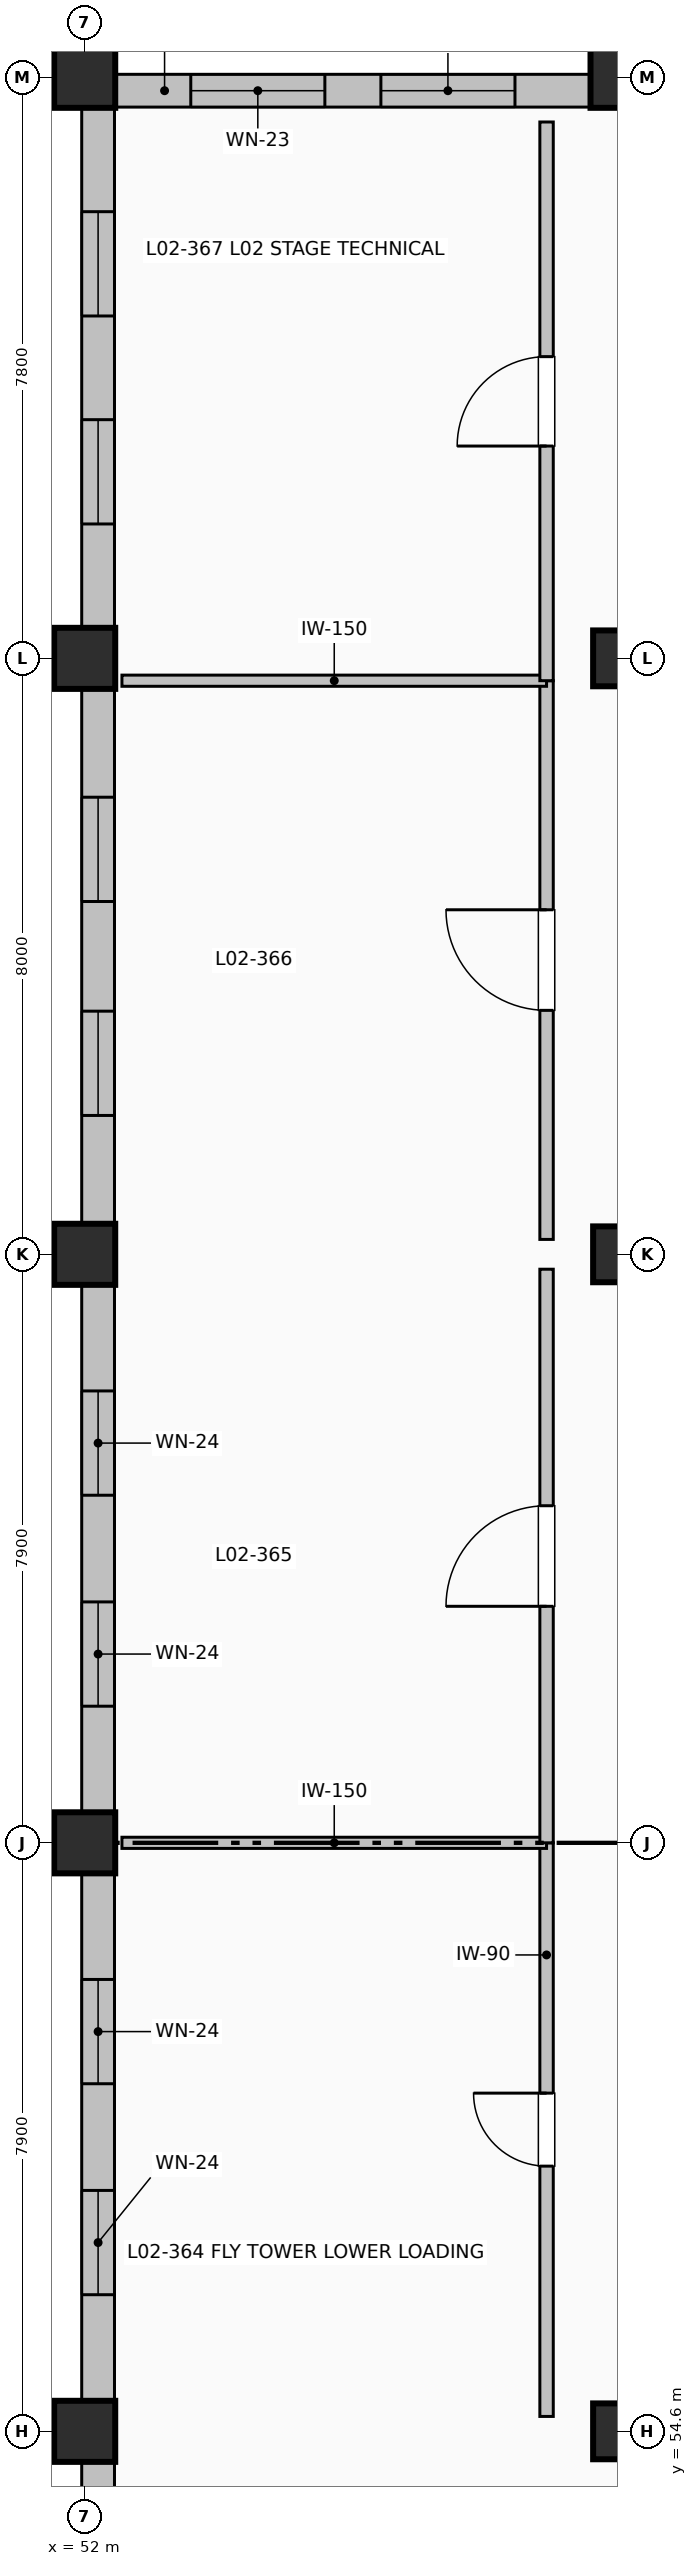
"""IFC4 building model, lengths in metres.
Left out: names, types, materials, properties, quantities, classifications, styles, units other than length and angle.
Written with IfcOpenShell. Run it as: python <this file> out.ifc"""

import sys

from ifc_helpers import new_model, si_unit, direction, frame, frame_2d, origin, origin_2d, place, context, subcontext, project, spatial, rectangle, extrude, element, fill, save


model = new_model("IFC4")
c1 = context("Model", 3, precision=1e-05, world=origin(), true_north=direction((0.0, 1.0)))
c2 = subcontext(c1, "Body", "Model", "MODEL_VIEW")
j1 = project(units=[si_unit("LENGTHUNIT", "METRE"), si_unit("PLANEANGLEUNIT", "RADIAN")], contexts=[c1])
p1 = place(None, origin())
s1 = spatial("IfcSite", under=j1, at=p1, CompositionType="ELEMENT")
p2 = place(p1, origin())
s2 = spatial("IfcBuilding", under=s1, at=p2, CompositionType="ELEMENT")
p3 = place(p2, frame((0.0, 0.0, 10.2)))
s3 = spatial("IfcBuildingStorey", under=s2, at=p3, CompositionType="ELEMENT", Elevation=10.2)
for number, where, z_axis, x_axis in (
    (1, (52.0, 54.6, 0.0), (0.0, 0.0, 1.0), (1.0, 0.0, 0.0)),
    (2, (52.0, 62.5, 0.0), (0.0, 0.0, 1.0), (1.0, 0.0, 0.0)),
    (3, (52.0, 70.4, 0.0), (0.0, 0.0, 1.0), (1.0, 0.0, 0.0)),
    (4, (52.0, 78.4, 0.0), (0.0, 0.0, 1.0), (1.0, 0.0, 0.0)),
    (5, (52.0, 86.2, 0.0), (0.0, 0.0, 1.0), (1.0, 0.0, 0.0)),
):
    element("IfcColumn", number, at=place(p3, frame(where, z_axis=z_axis, x_axis=x_axis)), inside=s3, PredefinedType="COLUMN", context=c2, shape_type="SweptSolid", body=[
        extrude(rectangle(XDim=0.82, YDim=0.82, at=origin_2d()), origin(), (0.0, 0.0, 1.0), 4.8),
    ])
for number, where, z_axis, x_axis in (
    (6, (59.2, 54.6, 0.0), (0.0, 0.0, 1.0), (1.0, 0.0, 0.0)),
    (7, (59.2, 70.4, 0.0), (0.0, 0.0, 1.0), (1.0, 0.0, 0.0)),
    (8, (59.2, 78.4, 0.0), (0.0, 0.0, 1.0), (1.0, 0.0, 0.0)),
):
    element("IfcColumn", number, at=place(p3, frame(where, z_axis=z_axis, x_axis=x_axis)), inside=s3, PredefinedType="COLUMN", context=c2, shape_type="SweptSolid", body=[
        extrude(rectangle(XDim=0.75, YDim=0.75, at=origin_2d()), origin(), (0.0, 0.0, 1.0), 4.8),
    ])
p4 = place(p3, frame((59.2, 86.2, 0.0), z_axis=(0.0, 0.0, 1.0), x_axis=(1.0, 0.0, 0.0)))
e9 = element("IfcColumn", 9, at=p4, inside=s3, PredefinedType="COLUMN", context=c2, shape_type="SweptSolid", body=[
    extrude(rectangle(XDim=0.82, YDim=0.82, at=origin_2d()), origin(), (0.0, 0.0, 1.0), 4.8),
])
p5 = place(p3, frame((52.41, 86.02, 0.0), z_axis=(0.0, 0.0, 1.0), x_axis=(1.0, 0.0, 0.0)))
e10 = element("IfcWall", 10, at=p5, inside=s3, PredefinedType="SOLIDWALL", context=c2, shape_type="SweptSolid", body=[
    extrude(rectangle(XDim=6.38, YDim=0.44, at=frame_2d((3.19, 0.0))), origin(), (0.0, 0.0, 1.0), 3.722),
])
p6 = place(p5, frame((1.014, 0.0, 1.05)))
e11 = element("IfcOpeningElement", 11, at=p6, cuts=e10, PredefinedType="OPENING", context=c2, shape_type="SweptSolid", body=[
    extrude(rectangle(XDim=1.8, YDim=1.25, at=frame_2d((0.9, 0.625))), frame((0.0, 0.23, 0.0), z_axis=(0.0, -1.0, 0.0), x_axis=(1.0, 0.0, 0.0)), (0.0, 0.0, 1.0), 0.46),
])
p7 = place(p5, frame((3.566, 0.0, 1.05)))
e12 = element("IfcOpeningElement", 12, at=p7, cuts=e10, PredefinedType="OPENING", context=c2, shape_type="SweptSolid", body=[
    extrude(rectangle(XDim=1.8, YDim=1.25, at=frame_2d((0.9, 0.625))), frame((0.0, 0.23, 0.0), z_axis=(0.0, -1.0, 0.0), x_axis=(1.0, 0.0, 0.0)), (0.0, 0.0, 1.0), 0.46),
])
p8 = place(p3, frame((52.18, 47.01, 0.0), z_axis=(0.0, 0.0, 1.0), x_axis=(0.0, 1.0, 0.0)))
e13 = element("IfcWall", 13, at=p8, inside=s3, PredefinedType="SOLIDWALL", context=c2, shape_type="SweptSolid", body=[
    extrude(rectangle(XDim=7.18, YDim=0.44, at=frame_2d((3.59, 0.0))), origin(), (0.0, 0.0, 1.0), 3.722),
])
p9 = place(p8, frame((1.454, 0.0, 1.0)))
e14 = element("IfcOpeningElement", 14, at=p9, cuts=e13, PredefinedType="OPENING", context=c2, shape_type="SweptSolid", body=[
    extrude(rectangle(XDim=1.4, YDim=1.2, at=frame_2d((0.7, 0.6))), frame((0.0, 0.23, 0.0), z_axis=(0.0, -1.0, 0.0), x_axis=(1.0, 0.0, 0.0)), (0.0, 0.0, 1.0), 0.46),
])
p10 = place(p8, frame((4.326, 0.0, 1.0)))
e15 = element("IfcOpeningElement", 15, at=p10, cuts=e13, PredefinedType="OPENING", context=c2, shape_type="SweptSolid", body=[
    extrude(rectangle(XDim=1.4, YDim=1.2, at=frame_2d((0.7, 0.6))), frame((0.0, 0.23, 0.0), z_axis=(0.0, -1.0, 0.0), x_axis=(1.0, 0.0, 0.0)), (0.0, 0.0, 1.0), 0.46),
])
p11 = place(p3, frame((52.18, 55.01, 0.0), z_axis=(0.0, 0.0, 1.0), x_axis=(0.0, 1.0, 0.0)))
e16 = element("IfcWall", 16, at=p11, inside=s3, PredefinedType="SOLIDWALL", context=c2, shape_type="SweptSolid", body=[
    extrude(rectangle(XDim=7.08, YDim=0.44, at=frame_2d((3.54, 0.0))), origin(), (0.0, 0.0, 1.0), 3.722),
])
p12 = place(p11, frame((1.424, 0.0, 1.0)))
e17 = element("IfcOpeningElement", 17, at=p12, cuts=e16, PredefinedType="OPENING", context=c2, shape_type="SweptSolid", body=[
    extrude(rectangle(XDim=1.4, YDim=1.2, at=frame_2d((0.7, 0.6))), frame((0.0, 0.23, 0.0), z_axis=(0.0, -1.0, 0.0), x_axis=(1.0, 0.0, 0.0)), (0.0, 0.0, 1.0), 0.46),
])
p13 = place(p11, frame((4.256, 0.0, 1.0)))
e18 = element("IfcOpeningElement", 18, at=p13, cuts=e16, PredefinedType="OPENING", context=c2, shape_type="SweptSolid", body=[
    extrude(rectangle(XDim=1.4, YDim=1.2, at=frame_2d((0.7, 0.6))), frame((0.0, 0.23, 0.0), z_axis=(0.0, -1.0, 0.0), x_axis=(1.0, 0.0, 0.0)), (0.0, 0.0, 1.0), 0.46),
])
p14 = place(p3, frame((52.18, 62.91, 0.0), z_axis=(0.0, 0.0, 1.0), x_axis=(0.0, 1.0, 0.0)))
e19 = element("IfcWall", 19, at=p14, inside=s3, PredefinedType="SOLIDWALL", context=c2, shape_type="SweptSolid", body=[
    extrude(rectangle(XDim=7.08, YDim=0.44, at=frame_2d((3.54, 0.0))), origin(), (0.0, 0.0, 1.0), 3.722),
])
p15 = place(p14, frame((1.424, 0.0, 1.0)))
e20 = element("IfcOpeningElement", 20, at=p15, cuts=e19, PredefinedType="OPENING", context=c2, shape_type="SweptSolid", body=[
    extrude(rectangle(XDim=1.4, YDim=1.2, at=frame_2d((0.7, 0.6))), frame((0.0, 0.23, 0.0), z_axis=(0.0, -1.0, 0.0), x_axis=(1.0, 0.0, 0.0)), (0.0, 0.0, 1.0), 0.46),
])
p16 = place(p14, frame((4.256, 0.0, 1.0)))
e21 = element("IfcOpeningElement", 21, at=p16, cuts=e19, PredefinedType="OPENING", context=c2, shape_type="SweptSolid", body=[
    extrude(rectangle(XDim=1.4, YDim=1.2, at=frame_2d((0.7, 0.6))), frame((0.0, 0.23, 0.0), z_axis=(0.0, -1.0, 0.0), x_axis=(1.0, 0.0, 0.0)), (0.0, 0.0, 1.0), 0.46),
])
p17 = place(p3, frame((52.18, 70.81, 0.0), z_axis=(0.0, 0.0, 1.0), x_axis=(0.0, 1.0, 0.0)))
e22 = element("IfcWall", 22, at=p17, inside=s3, PredefinedType="SOLIDWALL", context=c2, shape_type="SweptSolid", body=[
    extrude(rectangle(XDim=7.18, YDim=0.44, at=frame_2d((3.59, 0.0))), origin(), (0.0, 0.0, 1.0), 3.722),
])
p18 = place(p17, frame((1.454, 0.0, 1.0)))
e23 = element("IfcOpeningElement", 23, at=p18, cuts=e22, PredefinedType="OPENING", context=c2, shape_type="SweptSolid", body=[
    extrude(rectangle(XDim=1.4, YDim=1.2, at=frame_2d((0.7, 0.6))), frame((0.0, 0.23, 0.0), z_axis=(0.0, -1.0, 0.0), x_axis=(1.0, 0.0, 0.0)), (0.0, 0.0, 1.0), 0.46),
])
p19 = place(p17, frame((4.326, 0.0, 1.0)))
e24 = element("IfcOpeningElement", 24, at=p19, cuts=e22, PredefinedType="OPENING", context=c2, shape_type="SweptSolid", body=[
    extrude(rectangle(XDim=1.4, YDim=1.2, at=frame_2d((0.7, 0.6))), frame((0.0, 0.23, 0.0), z_axis=(0.0, -1.0, 0.0), x_axis=(1.0, 0.0, 0.0)), (0.0, 0.0, 1.0), 0.46),
])
p20 = place(p3, frame((52.18, 78.81, 0.0), z_axis=(0.0, 0.0, 1.0), x_axis=(0.0, 1.0, 0.0)))
e25 = element("IfcWall", 25, at=p20, inside=s3, PredefinedType="SOLIDWALL", context=c2, shape_type="SweptSolid", body=[
    extrude(rectangle(XDim=6.98, YDim=0.44, at=frame_2d((3.49, 0.0))), origin(), (0.0, 0.0, 1.0), 3.722),
])
p21 = place(p20, frame((1.394, 0.0, 1.0)))
e26 = element("IfcOpeningElement", 26, at=p21, cuts=e25, PredefinedType="OPENING", context=c2, shape_type="SweptSolid", body=[
    extrude(rectangle(XDim=1.4, YDim=1.2, at=frame_2d((0.7, 0.6))), frame((0.0, 0.23, 0.0), z_axis=(0.0, -1.0, 0.0), x_axis=(1.0, 0.0, 0.0)), (0.0, 0.0, 1.0), 0.46),
])
p22 = place(p20, frame((4.186, 0.0, 1.0)))
e27 = element("IfcOpeningElement", 27, at=p22, cuts=e25, PredefinedType="OPENING", context=c2, shape_type="SweptSolid", body=[
    extrude(rectangle(XDim=1.4, YDim=1.2, at=frame_2d((0.7, 0.6))), frame((0.0, 0.23, 0.0), z_axis=(0.0, -1.0, 0.0), x_axis=(1.0, 0.0, 0.0)), (0.0, 0.0, 1.0), 0.46),
])
p23 = place(p3, frame((58.2, 54.8, 0.0), z_axis=(0.0, 0.0, 1.0), x_axis=(0.0, 1.0, 0.0)))
e28 = element("IfcWall", 28, at=p23, inside=s3, PredefinedType="PARTITIONING", context=c2, shape_type="SweptSolid", body=[
    extrude(rectangle(XDim=7.7, YDim=0.18, at=frame_2d((3.85, 0.0))), origin(), (0.0, 0.0, 1.0), 4.472),
])
p24 = place(p23, frame((3.36, 0.0, 0.0)))
e29 = element("IfcOpeningElement", 29, at=p24, cuts=e28, PredefinedType="OPENING", context=c2, shape_type="SweptSolid", body=[
    extrude(rectangle(XDim=0.98, YDim=2.08, at=frame_2d((0.49, 1.04))), frame((0.0, 0.1, 0.0), z_axis=(0.0, -1.0, 0.0), x_axis=(1.0, 0.0, 0.0)), (0.0, 0.0, 1.0), 0.2),
])
p25 = place(p3, frame((52.5, 62.5, 0.0), z_axis=(0.0, 0.0, 1.0), x_axis=(1.0, 0.0, 0.0)))
e30 = element("IfcWall", 30, at=p25, inside=s3, PredefinedType="PARTITIONING", context=c2, shape_type="SweptSolid", body=[
    extrude(rectangle(XDim=5.7, YDim=0.15, at=frame_2d((2.85, 0.0))), origin(), (0.0, 0.0, 1.0), 2.872),
])
p26 = place(p3, frame((58.2, 62.5, 0.0), z_axis=(0.0, 0.0, 1.0), x_axis=(0.0, 1.0, 0.0)))
e31 = element("IfcWall", 31, at=p26, inside=s3, PredefinedType="PARTITIONING", context=c2, shape_type="SweptSolid", body=[
    extrude(rectangle(XDim=7.7, YDim=0.18, at=frame_2d((3.85, 0.0))), origin(), (0.0, 0.0, 1.0), 4.472),
])
p27 = place(p26, frame((3.175, 0.0, 0.0)))
e32 = element("IfcOpeningElement", 32, at=p27, cuts=e31, PredefinedType="OPENING", context=c2, shape_type="SweptSolid", body=[
    extrude(rectangle(XDim=1.35, YDim=2.16, at=frame_2d((0.675, 1.08))), frame((0.0, 0.1, 0.0), z_axis=(0.0, -1.0, 0.0), x_axis=(1.0, 0.0, 0.0)), (0.0, 0.0, 1.0), 0.2),
])
p28 = place(p3, frame((58.2, 70.6, 0.0), z_axis=(0.0, 0.0, 1.0), x_axis=(0.0, 1.0, 0.0)))
e33 = element("IfcWall", 33, at=p28, inside=s3, PredefinedType="PARTITIONING", context=c2, shape_type="SweptSolid", body=[
    extrude(rectangle(XDim=7.5, YDim=0.18, at=frame_2d((3.75, 0.0))), origin(), (0.0, 0.0, 1.0), 4.472),
])
p29 = place(p28, frame((3.075, 0.0, 0.0)))
e34 = element("IfcOpeningElement", 34, at=p29, cuts=e33, PredefinedType="OPENING", context=c2, shape_type="SweptSolid", body=[
    extrude(rectangle(XDim=1.35, YDim=2.16, at=frame_2d((0.675, 1.08))), frame((0.0, 0.1, 0.0), z_axis=(0.0, -1.0, 0.0), x_axis=(1.0, 0.0, 0.0)), (0.0, 0.0, 1.0), 0.2),
])
p30 = place(p3, frame((52.5, 78.1, 0.0), z_axis=(0.0, 0.0, 1.0), x_axis=(1.0, 0.0, 0.0)))
e35 = element("IfcWall", 35, at=p30, inside=s3, PredefinedType="PARTITIONING", context=c2, shape_type="SweptSolid", body=[
    extrude(rectangle(XDim=5.7, YDim=0.15, at=frame_2d((2.85, 0.0))), origin(), (0.0, 0.0, 1.0), 4.472),
])
p31 = place(p3, frame((58.2, 78.1, 0.0), z_axis=(0.0, 0.0, 1.0), x_axis=(0.0, 1.0, 0.0)))
e36 = element("IfcWall", 36, at=p31, inside=s3, PredefinedType="PARTITIONING", context=c2, shape_type="SweptSolid", body=[
    extrude(rectangle(XDim=7.5, YDim=0.18, at=frame_2d((3.75, 0.0))), origin(), (0.0, 0.0, 1.0), 4.472),
])
p32 = place(p31, frame((3.15, 0.0, 0.0)))
e37 = element("IfcOpeningElement", 37, at=p32, cuts=e36, PredefinedType="OPENING", context=c2, shape_type="SweptSolid", body=[
    extrude(rectangle(XDim=1.2, YDim=2.1, at=frame_2d((0.6, 1.05))), frame((0.0, 0.1, 0.0), z_axis=(0.0, -1.0, 0.0), x_axis=(1.0, 0.0, 0.0)), (0.0, 0.0, 1.0), 0.2),
])
p33 = place(p6, origin())
e38 = element("IfcWindow", 38, at=p33, inside=s3, PartitioningType="SINGLE_PANEL", PredefinedType="WINDOW", context=c2, shape_type="SweptSolid", body=[
    extrude(rectangle(XDim=1.8, YDim=1.25, at=frame_2d((0.9, 0.625))), frame((0.0, 0.03, 0.0), z_axis=(0.0, -1.0, 0.0), x_axis=(1.0, 0.0, 0.0)), (0.0, 0.0, 1.0), 0.06),
])
fill(e11, e38)
p34 = place(p7, origin())
e39 = element("IfcWindow", 39, at=p34, inside=s3, PartitioningType="SINGLE_PANEL", PredefinedType="WINDOW", context=c2, shape_type="SweptSolid", body=[
    extrude(rectangle(XDim=1.8, YDim=1.25, at=frame_2d((0.9, 0.625))), frame((0.0, 0.03, 0.0), z_axis=(0.0, -1.0, 0.0), x_axis=(1.0, 0.0, 0.0)), (0.0, 0.0, 1.0), 0.06),
])
fill(e12, e39)
p35 = place(p12, origin())
e40 = element("IfcWindow", 40, at=p35, inside=s3, PartitioningType="SINGLE_PANEL", PredefinedType="WINDOW", context=c2, shape_type="SweptSolid", body=[
    extrude(rectangle(XDim=1.4, YDim=1.2, at=frame_2d((0.7, 0.6))), frame((0.0, 0.03, 0.0), z_axis=(0.0, -1.0, 0.0), x_axis=(1.0, 0.0, 0.0)), (0.0, 0.0, 1.0), 0.06),
])
fill(e17, e40)
p36 = place(p13, origin())
e41 = element("IfcWindow", 41, at=p36, inside=s3, PartitioningType="SINGLE_PANEL", PredefinedType="WINDOW", context=c2, shape_type="SweptSolid", body=[
    extrude(rectangle(XDim=1.4, YDim=1.2, at=frame_2d((0.7, 0.6))), frame((0.0, 0.03, 0.0), z_axis=(0.0, -1.0, 0.0), x_axis=(1.0, 0.0, 0.0)), (0.0, 0.0, 1.0), 0.06),
])
fill(e18, e41)
p37 = place(p15, origin())
e42 = element("IfcWindow", 42, at=p37, inside=s3, PartitioningType="SINGLE_PANEL", PredefinedType="WINDOW", context=c2, shape_type="SweptSolid", body=[
    extrude(rectangle(XDim=1.4, YDim=1.2, at=frame_2d((0.7, 0.6))), frame((0.0, 0.03, 0.0), z_axis=(0.0, -1.0, 0.0), x_axis=(1.0, 0.0, 0.0)), (0.0, 0.0, 1.0), 0.06),
])
fill(e20, e42)
p38 = place(p16, origin())
e43 = element("IfcWindow", 43, at=p38, inside=s3, PartitioningType="SINGLE_PANEL", PredefinedType="WINDOW", context=c2, shape_type="SweptSolid", body=[
    extrude(rectangle(XDim=1.4, YDim=1.2, at=frame_2d((0.7, 0.6))), frame((0.0, 0.03, 0.0), z_axis=(0.0, -1.0, 0.0), x_axis=(1.0, 0.0, 0.0)), (0.0, 0.0, 1.0), 0.06),
])
fill(e21, e43)
p39 = place(p18, origin())
e44 = element("IfcWindow", 44, at=p39, inside=s3, PartitioningType="SINGLE_PANEL", PredefinedType="WINDOW", context=c2, shape_type="SweptSolid", body=[
    extrude(rectangle(XDim=1.4, YDim=1.2, at=frame_2d((0.7, 0.6))), frame((0.0, 0.03, 0.0), z_axis=(0.0, -1.0, 0.0), x_axis=(1.0, 0.0, 0.0)), (0.0, 0.0, 1.0), 0.06),
])
fill(e23, e44)
p40 = place(p19, origin())
e45 = element("IfcWindow", 45, at=p40, inside=s3, PartitioningType="SINGLE_PANEL", PredefinedType="WINDOW", context=c2, shape_type="SweptSolid", body=[
    extrude(rectangle(XDim=1.4, YDim=1.2, at=frame_2d((0.7, 0.6))), frame((0.0, 0.03, 0.0), z_axis=(0.0, -1.0, 0.0), x_axis=(1.0, 0.0, 0.0)), (0.0, 0.0, 1.0), 0.06),
])
fill(e24, e45)
p41 = place(p21, origin())
e46 = element("IfcWindow", 46, at=p41, inside=s3, PartitioningType="SINGLE_PANEL", PredefinedType="WINDOW", context=c2, shape_type="SweptSolid", body=[
    extrude(rectangle(XDim=1.4, YDim=1.2, at=frame_2d((0.7, 0.6))), frame((0.0, 0.03, 0.0), z_axis=(0.0, -1.0, 0.0), x_axis=(1.0, 0.0, 0.0)), (0.0, 0.0, 1.0), 0.06),
])
fill(e26, e46)
p42 = place(p22, origin())
e47 = element("IfcWindow", 47, at=p42, inside=s3, PartitioningType="SINGLE_PANEL", PredefinedType="WINDOW", context=c2, shape_type="SweptSolid", body=[
    extrude(rectangle(XDim=1.4, YDim=1.2, at=frame_2d((0.7, 0.6))), frame((0.0, 0.03, 0.0), z_axis=(0.0, -1.0, 0.0), x_axis=(1.0, 0.0, 0.0)), (0.0, 0.0, 1.0), 0.06),
])
fill(e27, e47)
p43 = place(p24, origin())
e48 = element("IfcDoor", 48, at=p43, inside=s3, OperationType="SINGLE_SWING_RIGHT", PredefinedType="DOOR", context=c2, shape_type="SweptSolid", body=[
    extrude(rectangle(XDim=0.98, YDim=2.08, at=frame_2d((0.49, 1.04))), frame((0.0, 0.025, 0.0), z_axis=(0.0, -1.0, 0.0), x_axis=(1.0, 0.0, 0.0)), (0.0, 0.0, 1.0), 0.05),
])
fill(e29, e48)
p44 = place(p27, origin())
e49 = element("IfcDoor", 49, at=p44, inside=s3, OperationType="SINGLE_SWING_LEFT", PredefinedType="DOOR", context=c2, shape_type="SweptSolid", body=[
    extrude(rectangle(XDim=1.35, YDim=2.16, at=frame_2d((0.675, 1.08))), frame((0.0, 0.025, 0.0), z_axis=(0.0, -1.0, 0.0), x_axis=(1.0, 0.0, 0.0)), (0.0, 0.0, 1.0), 0.05),
])
fill(e32, e49)
p45 = place(p29, origin())
e50 = element("IfcDoor", 50, at=p45, inside=s3, OperationType="SINGLE_SWING_RIGHT", PredefinedType="DOOR", context=c2, shape_type="SweptSolid", body=[
    extrude(rectangle(XDim=1.35, YDim=2.16, at=frame_2d((0.675, 1.08))), frame((0.0, 0.025, 0.0), z_axis=(0.0, -1.0, 0.0), x_axis=(1.0, 0.0, 0.0)), (0.0, 0.0, 1.0), 0.05),
])
fill(e34, e50)
p46 = place(p32, origin())
e51 = element("IfcDoor", 51, at=p46, inside=s3, OperationType="SINGLE_SWING_LEFT", PredefinedType="DOOR", context=c2, shape_type="SweptSolid", body=[
    extrude(rectangle(XDim=1.2, YDim=2.1, at=frame_2d((0.6, 1.05))), frame((0.0, 0.025, 0.0), z_axis=(0.0, -1.0, 0.0), x_axis=(1.0, 0.0, 0.0)), (0.0, 0.0, 1.0), 0.05),
])
fill(e37, e51)
save(model, sys.argv[1])
